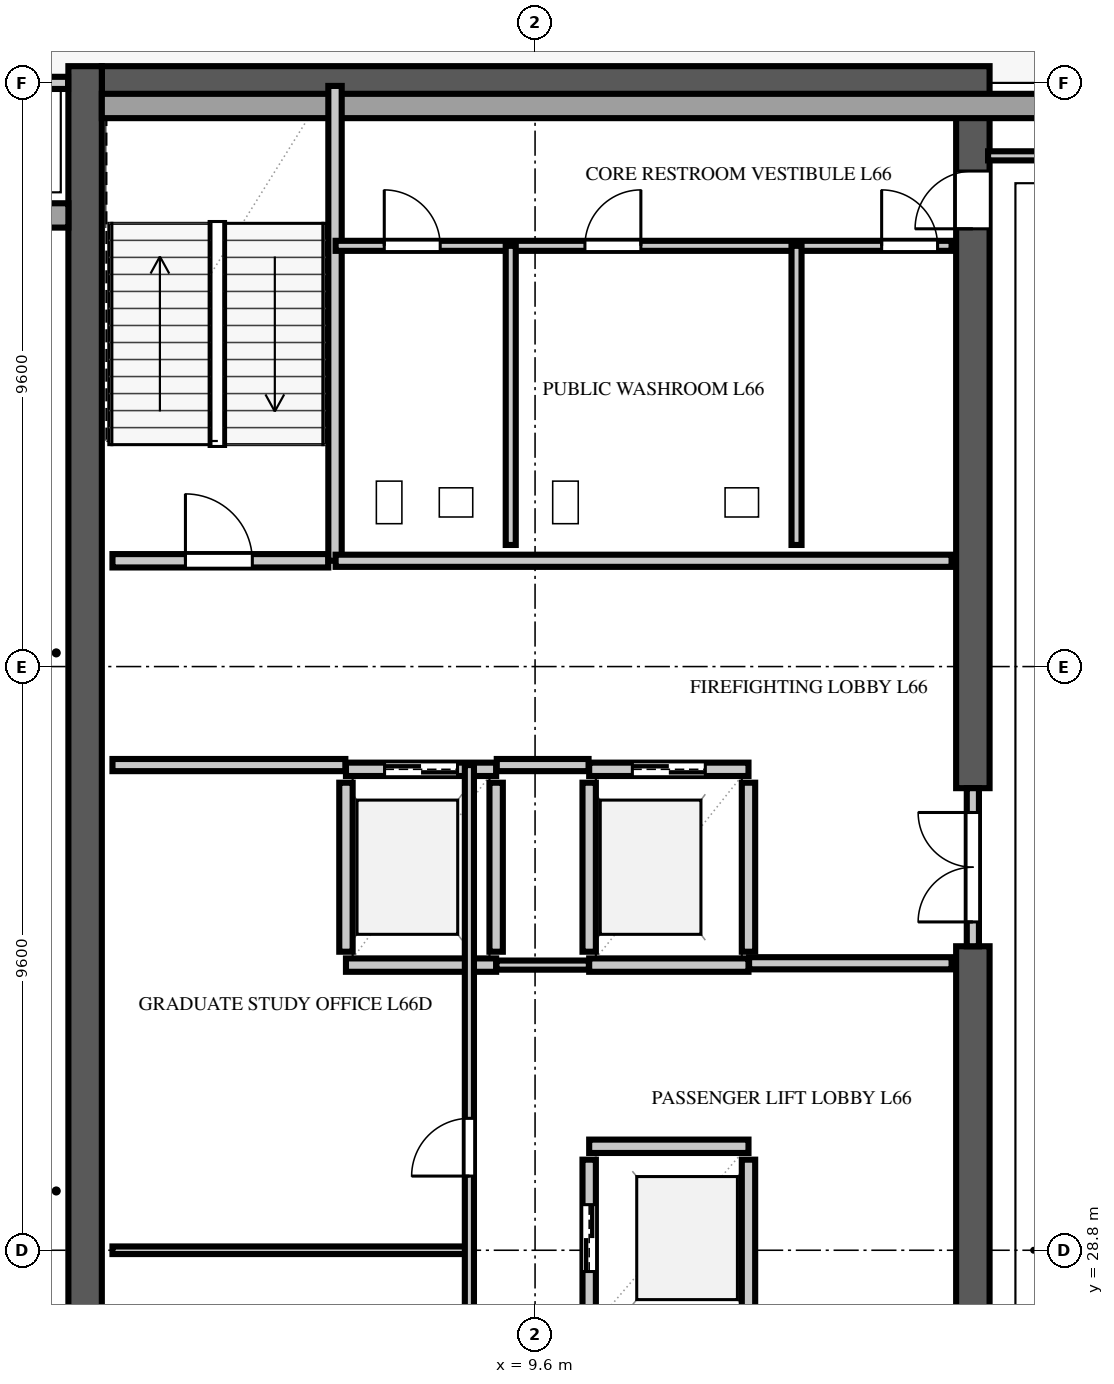
"""IFC4 building model, lengths in metres.
Left out: names, types, materials, properties, quantities, classifications, styles, units other than length and angle.
Written with IfcOpenShell. Run it as: python <this file> out.ifc"""

import sys

from ifc_helpers import new_model, si_unit, direction, frame, frame_2d, origin, place, context, subcontext, project, spatial, rectangle, extrude, element, fill, save


model = new_model("IFC4")
c1 = context("Model", 3, precision=1e-05, world=origin(), true_north=direction((0.0, 1.0)))
c2 = subcontext(c1, "Body", "Model", "MODEL_VIEW")
j1 = project(units=[si_unit("LENGTHUNIT", "METRE"), si_unit("PLANEANGLEUNIT", "RADIAN")], contexts=[c1])
p1 = place(None, origin())
s1 = spatial("IfcSite", under=j1, at=p1, CompositionType="ELEMENT")
p2 = place(p1, origin())
s2 = spatial("IfcBuilding", under=s1, at=p2, CompositionType="ELEMENT")
p3 = place(p2, frame((0.0, 0.0, 261.0)))
s3 = spatial("IfcBuildingStorey", under=s2, at=p3, CompositionType="ELEMENT", Elevation=261.0)
p4 = place(p3, frame((2.475, 48.0, 0.0), z_axis=(0.0, 0.0, 1.0), x_axis=(1.0, 0.0, 0.0)))
e1 = element("IfcWall", 1, at=p4, inside=s3, PredefinedType="SHEAR", context=c2, shape_type="SweptSolid", body=[
    extrude(rectangle(XDim=14.6, YDim=0.55, at=frame_2d((7.3, 0.0))), origin(), (0.0, 0.0, 1.0), 4.54),
])
p5 = place(p3, frame((2.2, 9.325, 0.0), z_axis=(0.0, 0.0, 1.0), x_axis=(0.0, 1.0, 0.0)))
e2 = element("IfcWall", 2, at=p5, inside=s3, PredefinedType="SHEAR", context=c2, shape_type="SweptSolid", body=[
    extrude(rectangle(XDim=38.95, YDim=0.55, at=frame_2d((19.475, 0.0))), origin(), (0.0, 0.0, 1.0), 4.54),
])
p6 = place(p3, frame((16.8, 26.0, 0.0), z_axis=(0.0, 0.0, 1.0), x_axis=(0.0, 1.0, 0.0)))
e3 = element("IfcWall", 3, at=p6, inside=s3, PredefinedType="SHEAR", context=c2, shape_type="SweptSolid", body=[
    extrude(rectangle(XDim=7.8, YDim=0.55, at=frame_2d((3.9, 0.0))), origin(), (0.0, 0.0, 1.0), 4.54),
])
p7 = place(p3, frame((16.8, 36.4, 0.0), z_axis=(0.0, 0.0, 1.0), x_axis=(0.0, 1.0, 0.0)))
e4 = element("IfcWall", 4, at=p7, inside=s3, PredefinedType="SHEAR", context=c2, shape_type="SweptSolid", body=[
    extrude(rectangle(XDim=11.325, YDim=0.55, at=frame_2d((5.663, 0.0))), origin(), (0.0, 0.0, 1.0), 4.54),
])
p8 = place(p7, frame((9.2, 0.0, 0.0)))
e5 = element("IfcOpeningElement", 5, at=p8, cuts=e4, PredefinedType="OPENING", context=c2, shape_type="SweptSolid", body=[
    extrude(rectangle(XDim=0.95, YDim=2.15, at=frame_2d((0.475, 1.075))), frame((0.0, 0.287, 0.0), z_axis=(0.0, -1.0, 0.0), x_axis=(1.0, 0.0, 0.0)), (0.0, 0.0, 1.0), 0.574),
])
p9 = place(p3, frame((36.56, 47.62, 0.0), z_axis=(0.0, 0.0, 1.0), x_axis=(-1.0, 0.0, 0.0)))
e6 = element("IfcWall", 6, at=p9, inside=s3, PredefinedType="SOLIDWALL", context=c2, shape_type="SweptSolid", body=[
    extrude(rectangle(XDim=34.085, YDim=0.4, at=frame_2d((17.042, 0.0))), origin(), (0.0, 0.0, 1.0), 4.54),
])
p10 = place(p9, frame((9.56, 0.0, 0.0)))
e7 = element("IfcOpeningElement", 7, at=p10, cuts=e6, PredefinedType="OPENING", context=c2, shape_type="SweptSolid", body=[
    extrude(rectangle(XDim=1.6, YDim=2.3, at=frame_2d((0.8, 1.15))), frame((0.0, 0.212, 0.0), z_axis=(0.0, -1.0, 0.0), x_axis=(1.0, 0.0, 0.0)), (0.0, 0.0, 1.0), 0.424),
])
p11 = place(p9, frame((4.885, 0.0, 0.9)))
e8 = element("IfcOpeningElement", 8, at=p11, cuts=e6, PredefinedType="OPENING", context=c2, shape_type="SweptSolid", body=[
    extrude(rectangle(XDim=0.95, YDim=1.85, at=frame_2d((0.475, 0.925))), frame((0.0, 0.212, 0.0), z_axis=(0.0, -1.0, 0.0), x_axis=(1.0, 0.0, 0.0)), (0.0, 0.0, 1.0), 0.424),
])
p12 = place(p9, frame((14.485, 0.0, 0.9)))
e9 = element("IfcOpeningElement", 9, at=p12, cuts=e6, PredefinedType="OPENING", context=c2, shape_type="SweptSolid", body=[
    extrude(rectangle(XDim=0.95, YDim=1.85, at=frame_2d((0.475, 0.925))), frame((0.0, 0.212, 0.0), z_axis=(0.0, -1.0, 0.0), x_axis=(1.0, 0.0, 0.0)), (0.0, 0.0, 1.0), 0.424),
])
p13 = place(p3, frame((1.925, 45.82, 0.0), z_axis=(0.0, 0.0, 1.0), x_axis=(-1.0, 0.0, 0.0)))
e10 = element("IfcWall", 10, at=p13, inside=s3, PredefinedType="SOLIDWALL", context=c2, shape_type="SweptSolid", body=[
    extrude(rectangle(XDim=1.885, YDim=0.4, at=frame_2d((0.942, 0.0))), origin(), (0.0, 0.0, 1.0), 4.54),
])
p14 = place(p3, frame((2.65, 40.14, 0.0), z_axis=(0.0, 0.0, 1.0), x_axis=(1.0, 0.0, 0.0)))
e11 = element("IfcWall", 11, at=p14, inside=s3, PredefinedType="SOLIDWALL", context=c2, shape_type="SweptSolid", body=[
    extrude(rectangle(XDim=3.55, YDim=0.22, at=frame_2d((1.775, 0.0))), origin(), (0.0, 0.0, 1.0), 4.54),
])
p15 = place(p14, frame((1.2, 0.0, 0.0)))
e12 = element("IfcOpeningElement", 12, at=p15, cuts=e11, PredefinedType="OPENING", context=c2, shape_type="SweptSolid", body=[
    extrude(rectangle(XDim=1.1, YDim=2.2, at=frame_2d((0.55, 1.1))), frame((0.0, 0.122, 0.0), z_axis=(0.0, -1.0, 0.0), x_axis=(1.0, 0.0, 0.0)), (0.0, 0.0, 1.0), 0.244),
])
p16 = place(p3, frame((6.31, 40.14, 0.0), z_axis=(0.0, 0.0, 1.0), x_axis=(0.0, 1.0, 0.0)))
e13 = element("IfcWall", 13, at=p16, inside=s3, PredefinedType="SOLIDWALL", context=c2, shape_type="SweptSolid", body=[
    extrude(rectangle(XDim=7.81, YDim=0.22, at=frame_2d((3.905, 0.0))), origin(), (0.0, 0.0, 1.0), 4.54),
])
p17 = place(p3, frame((10.49, 27.71, 0.0), z_axis=(0.0, 0.0, 1.0), x_axis=(0.0, 1.0, 0.0)))
e14 = element("IfcWall", 14, at=p17, inside=s3, PredefinedType="SOLIDWALL", context=c2, shape_type="SweptSolid", body=[
    extrude(rectangle(XDim=2.58, YDim=0.22, at=frame_2d((1.29, 0.0))), origin(), (0.0, 0.0, 1.0), 4.54),
])
p18 = place(p17, frame((0.74, 0.0, 0.0)))
e15 = element("IfcOpeningElement", 15, at=p18, cuts=e14, PredefinedType="OPENING", context=c2, shape_type="SweptSolid", body=[
    extrude(rectangle(XDim=1.1, YDim=2.2, at=frame_2d((0.55, 1.1))), frame((0.0, 0.122, 0.0), z_axis=(0.0, -1.0, 0.0), x_axis=(1.0, 0.0, 0.0)), (0.0, 0.0, 1.0), 0.244),
])
p19 = place(p3, frame((13.11, 27.71, 0.0), z_axis=(0.0, 0.0, 1.0), x_axis=(0.0, 1.0, 0.0)))
e16 = element("IfcWall", 16, at=p19, inside=s3, PredefinedType="SOLIDWALL", context=c2, shape_type="SweptSolid", body=[
    extrude(rectangle(XDim=2.58, YDim=0.22, at=frame_2d((1.29, 0.0))), origin(), (0.0, 0.0, 1.0), 4.54),
])
p20 = place(p3, frame((10.49, 30.51, 0.0), z_axis=(0.0, 0.0, 1.0), x_axis=(1.0, 0.0, 0.0)))
e17 = element("IfcWall", 17, at=p20, inside=s3, PredefinedType="SOLIDWALL", context=c2, shape_type="SweptSolid", body=[
    extrude(rectangle(XDim=2.62, YDim=0.22, at=frame_2d((1.31, 0.0))), origin(), (0.0, 0.0, 1.0), 4.54),
])
for number, where, z_axis, x_axis in (
    (18, (6.49, 33.71, 0.0), (0.0, 0.0, 1.0), (0.0, 1.0, 0.0)),
    (19, (8.96, 33.71, 0.0), (0.0, 0.0, 1.0), (0.0, 1.0, 0.0)),
):
    element("IfcWall", number, at=place(p3, frame(where, z_axis=z_axis, x_axis=x_axis)), inside=s3, PredefinedType="SOLIDWALL", context=c2, shape_type="SweptSolid", body=[
        extrude(rectangle(XDim=2.78, YDim=0.22, at=frame_2d((1.39, 0.0))), origin(), (0.0, 0.0, 1.0), 4.54),
    ])
p21 = place(p3, frame((6.49, 33.49, 0.0), z_axis=(0.0, 0.0, 1.0), x_axis=(1.0, 0.0, 0.0)))
e20 = element("IfcWall", 20, at=p21, inside=s3, PredefinedType="SOLIDWALL", context=c2, shape_type="SweptSolid", body=[
    extrude(rectangle(XDim=2.47, YDim=0.22, at=frame_2d((1.235, 0.0))), origin(), (0.0, 0.0, 1.0), 4.54),
])
p22 = place(p3, frame((6.49, 36.71, 0.0), z_axis=(0.0, 0.0, 1.0), x_axis=(1.0, 0.0, 0.0)))
e21 = element("IfcWall", 21, at=p22, inside=s3, PredefinedType="SOLIDWALL", context=c2, shape_type="SweptSolid", body=[
    extrude(rectangle(XDim=2.47, YDim=0.22, at=frame_2d((1.235, 0.0))), origin(), (0.0, 0.0, 1.0), 4.54),
])
p23 = place(p22, frame((0.635, 0.0, 0.0)))
e22 = element("IfcOpeningElement", 22, at=p23, cuts=e21, PredefinedType="OPENING", context=c2, shape_type="SweptSolid", body=[
    extrude(rectangle(XDim=1.2, YDim=2.2, at=frame_2d((0.6, 1.1))), frame((0.0, 0.122, 0.0), z_axis=(0.0, -1.0, 0.0), x_axis=(1.0, 0.0, 0.0)), (0.0, 0.0, 1.0), 0.244),
])
for number, where, z_axis, x_axis in (
    (23, (10.49, 33.71, 0.0), (0.0, 0.0, 1.0), (0.0, 1.0, 0.0)),
    (24, (13.11, 33.71, 0.0), (0.0, 0.0, 1.0), (0.0, 1.0, 0.0)),
):
    element("IfcWall", number, at=place(p3, frame(where, z_axis=z_axis, x_axis=x_axis)), inside=s3, PredefinedType="SOLIDWALL", context=c2, shape_type="SweptSolid", body=[
        extrude(rectangle(XDim=2.78, YDim=0.22, at=frame_2d((1.39, 0.0))), origin(), (0.0, 0.0, 1.0), 4.54),
    ])
p24 = place(p3, frame((10.49, 33.49, 0.0), z_axis=(0.0, 0.0, 1.0), x_axis=(1.0, 0.0, 0.0)))
e25 = element("IfcWall", 25, at=p24, inside=s3, PredefinedType="SOLIDWALL", context=c2, shape_type="SweptSolid", body=[
    extrude(rectangle(XDim=2.62, YDim=0.22, at=frame_2d((1.31, 0.0))), origin(), (0.0, 0.0, 1.0), 4.54),
])
p25 = place(p3, frame((10.49, 36.71, 0.0), z_axis=(0.0, 0.0, 1.0), x_axis=(1.0, 0.0, 0.0)))
e26 = element("IfcWall", 26, at=p25, inside=s3, PredefinedType="SOLIDWALL", context=c2, shape_type="SweptSolid", body=[
    extrude(rectangle(XDim=2.62, YDim=0.22, at=frame_2d((1.31, 0.0))), origin(), (0.0, 0.0, 1.0), 4.54),
])
p26 = place(p25, frame((0.71, 0.0, 0.0)))
e27 = element("IfcOpeningElement", 27, at=p26, cuts=e26, PredefinedType="OPENING", context=c2, shape_type="SweptSolid", body=[
    extrude(rectangle(XDim=1.2, YDim=2.2, at=frame_2d((0.6, 1.1))), frame((0.0, 0.122, 0.0), z_axis=(0.0, -1.0, 0.0), x_axis=(1.0, 0.0, 0.0)), (0.0, 0.0, 1.0), 0.244),
])
p27 = place(p3, frame((2.65, 36.78, 0.0), z_axis=(0.0, 0.0, 1.0), x_axis=(1.0, 0.0, 0.0)))
e28 = element("IfcWall", 28, at=p27, inside=s3, PredefinedType="SOLIDWALL", context=c2, shape_type="SweptSolid", body=[
    extrude(rectangle(XDim=3.83, YDim=0.2, at=frame_2d((1.915, 0.0))), origin(), (0.0, 0.0, 1.0), 4.54),
])
p28 = place(p3, frame((8.97, 36.78, 0.0), z_axis=(0.0, 0.0, 1.0), x_axis=(1.0, 0.0, 0.0)))
e29 = element("IfcWall", 29, at=p28, inside=s3, PredefinedType="SOLIDWALL", context=c2, shape_type="SweptSolid", body=[
    extrude(rectangle(XDim=1.51, YDim=0.2, at=frame_2d((0.755, 0.0))), origin(), (0.0, 0.0, 1.0), 4.54),
])
p29 = place(p3, frame((13.12, 33.52, 0.0), z_axis=(0.0, 0.0, 1.0), x_axis=(1.0, 0.0, 0.0)))
e30 = element("IfcWall", 30, at=p29, inside=s3, PredefinedType="SOLIDWALL", context=c2, shape_type="SweptSolid", body=[
    extrude(rectangle(XDim=3.33, YDim=0.2, at=frame_2d((1.665, 0.0))), origin(), (0.0, 0.0, 1.0), 4.54),
])
p30 = place(p3, frame((6.32, 40.14, 0.0), z_axis=(0.0, 0.0, 1.0), x_axis=(1.0, 0.0, 0.0)))
e31 = element("IfcWall", 31, at=p30, inside=s3, PredefinedType="SOLIDWALL", context=c2, shape_type="SweptSolid", body=[
    extrude(rectangle(XDim=10.13, YDim=0.2, at=frame_2d((5.065, 0.0))), origin(), (0.0, 0.0, 1.0), 4.54),
])
p31 = place(p3, frame((16.8, 33.8, 0.0), z_axis=(0.0, 0.0, 1.0), x_axis=(0.0, 1.0, 0.0)))
e32 = element("IfcWall", 32, at=p31, inside=s3, PredefinedType="SOLIDWALL", context=c2, shape_type="SweptSolid", body=[
    extrude(rectangle(XDim=2.6, YDim=0.2, at=frame_2d((1.3, 0.0))), origin(), (0.0, 0.0, 1.0), 4.54),
])
p32 = place(p31, frame((0.4, 0.0, 0.0)))
e33 = element("IfcOpeningElement", 33, at=p32, cuts=e32, PredefinedType="OPENING", context=c2, shape_type="SweptSolid", body=[
    extrude(rectangle(XDim=1.8, YDim=2.2, at=frame_2d((0.9, 1.1))), frame((0.0, 0.112, 0.0), z_axis=(0.0, -1.0, 0.0), x_axis=(1.0, 0.0, 0.0)), (0.0, 0.0, 1.0), 0.224),
])
p33 = place(p3, frame((8.965, 33.49, 0.0), z_axis=(0.0, 0.0, 1.0), x_axis=(1.0, 0.0, 0.0)))
e34 = element("IfcWall", 34, at=p33, inside=s3, PredefinedType="PARTITIONING", context=c2, shape_type="SweptSolid", body=[
    extrude(rectangle(XDim=1.52, YDim=0.15, at=frame_2d((0.76, 0.0))), origin(), (0.0, 0.0, 1.0), 4.54),
])
p34 = place(p3, frame((2.65, 28.8, 0.0), z_axis=(0.0, 0.0, 1.0), x_axis=(1.0, 0.0, 0.0)))
e35 = element("IfcWall", 35, at=p34, inside=s3, PredefinedType="PARTITIONING", context=c2, shape_type="SweptSolid", body=[
    extrude(rectangle(XDim=5.87, YDim=0.125, at=frame_2d((2.935, 0.0))), origin(), (0.0, 0.0, 1.0), 4.54),
])
p35 = place(p3, frame((8.52, 12.02, 0.0), z_axis=(0.0, 0.0, 1.0), x_axis=(0.0, 1.0, 0.0)))
e36 = element("IfcWall", 36, at=p35, inside=s3, PredefinedType="PARTITIONING", context=c2, shape_type="SweptSolid", body=[
    extrude(rectangle(XDim=24.76, YDim=0.15, at=frame_2d((12.38, 0.0))), origin(), (0.0, 0.0, 1.0), 4.54),
])
p36 = place(p35, frame((2.0, 0.0, 0.0)))
e37 = element("IfcOpeningElement", 37, at=p36, cuts=e36, PredefinedType="OPENING", context=c2, shape_type="SweptSolid", body=[
    extrude(rectangle(XDim=0.85, YDim=2.1, at=frame_2d((0.425, 1.05))), frame((0.0, 0.087, 0.0), z_axis=(0.0, -1.0, 0.0), x_axis=(1.0, 0.0, 0.0)), (0.0, 0.0, 1.0), 0.174),
])
p37 = place(p35, frame((11.0, 0.0, 0.0)))
e38 = element("IfcOpeningElement", 38, at=p37, cuts=e36, PredefinedType="OPENING", context=c2, shape_type="SweptSolid", body=[
    extrude(rectangle(XDim=0.95, YDim=2.15, at=frame_2d((0.475, 1.075))), frame((0.0, 0.087, 0.0), z_axis=(0.0, -1.0, 0.0), x_axis=(1.0, 0.0, 0.0)), (0.0, 0.0, 1.0), 0.174),
])
p38 = place(p35, frame((18.0, 0.0, 0.0)))
e39 = element("IfcOpeningElement", 39, at=p38, cuts=e36, PredefinedType="OPENING", context=c2, shape_type="SweptSolid", body=[
    extrude(rectangle(XDim=0.95, YDim=2.15, at=frame_2d((0.475, 1.075))), frame((0.0, 0.087, 0.0), z_axis=(0.0, -1.0, 0.0), x_axis=(1.0, 0.0, 0.0)), (0.0, 0.0, 1.0), 0.174),
])
p39 = place(p3, frame((6.32, 45.32, 0.0), z_axis=(0.0, 0.0, 1.0), x_axis=(1.0, 0.0, 0.0)))
e40 = element("IfcWall", 40, at=p39, inside=s3, PredefinedType="PLUMBINGWALL", context=c2, shape_type="SweptSolid", body=[
    extrude(rectangle(XDim=10.13, YDim=0.165, at=frame_2d((5.065, 0.0))), origin(), (0.0, 0.0, 1.0), 4.54),
])
p40 = place(p39, frame((0.8, 0.0, 0.0)))
e41 = element("IfcOpeningElement", 41, at=p40, cuts=e40, PredefinedType="OPENING", context=c2, shape_type="SweptSolid", body=[
    extrude(rectangle(XDim=0.92, YDim=2.15, at=frame_2d((0.46, 1.075))), frame((0.0, 0.094, 0.0), z_axis=(0.0, -1.0, 0.0), x_axis=(1.0, 0.0, 0.0)), (0.0, 0.0, 1.0), 0.189),
])
p41 = place(p39, frame((4.1, 0.0, 0.0)))
e42 = element("IfcOpeningElement", 42, at=p41, cuts=e40, PredefinedType="OPENING", context=c2, shape_type="SweptSolid", body=[
    extrude(rectangle(XDim=0.92, YDim=2.15, at=frame_2d((0.46, 1.075))), frame((0.0, 0.094, 0.0), z_axis=(0.0, -1.0, 0.0), x_axis=(1.0, 0.0, 0.0)), (0.0, 0.0, 1.0), 0.189),
])
p42 = place(p39, frame((8.98, 0.0, 0.0)))
e43 = element("IfcOpeningElement", 43, at=p42, cuts=e40, PredefinedType="OPENING", context=c2, shape_type="SweptSolid", body=[
    extrude(rectangle(XDim=0.92, YDim=2.15, at=frame_2d((0.46, 1.075))), frame((0.0, 0.094, 0.0), z_axis=(0.0, -1.0, 0.0), x_axis=(1.0, 0.0, 0.0)), (0.0, 0.0, 1.0), 0.189),
])
for number, where, z_axis, x_axis in (
    (44, (9.2, 40.4, 0.0), (0.0, 0.0, 1.0), (0.0, 1.0, 0.0)),
    (45, (13.9, 40.4, 0.0), (0.0, 0.0, 1.0), (0.0, 1.0, 0.0)),
):
    element("IfcWall", number, at=place(p3, frame(where, z_axis=z_axis, x_axis=x_axis)), inside=s3, PredefinedType="PLUMBINGWALL", context=c2, shape_type="SweptSolid", body=[
        extrude(rectangle(XDim=4.92, YDim=0.165, at=frame_2d((2.46, 0.0))), origin(), (0.0, 0.0, 1.0), 4.54),
    ])
p43 = place(p3, frame((0.85, 48.0, 0.0), z_axis=(0.0, 0.0, 1.0), x_axis=(1.0, 0.0, 0.0)))
e46 = element("IfcWall", 46, at=p43, inside=s3, PredefinedType="SOLIDWALL", context=c2, shape_type="SweptSolid", body=[
    extrude(rectangle(XDim=1.07, YDim=0.2, at=frame_2d((0.535, 0.0))), origin(), (0.0, 0.0, 1.0), 4.54),
])
p44 = place(p3, frame((17.05, 46.8, 0.0), z_axis=(0.0, 0.0, 1.0), x_axis=(1.0, 0.0, 0.0)))
e47 = element("IfcWall", 47, at=p44, inside=s3, PredefinedType="PARTITIONING", context=c2, shape_type="SweptSolid", body=[
    extrude(rectangle(XDim=2.15, YDim=0.15, at=frame_2d((1.075, 0.0))), origin(), (0.0, 0.0, 1.0), 4.54),
])
p45 = place(p15, origin())
e48 = element("IfcDoor", 48, at=p45, inside=s3, OperationType="SINGLE_SWING_LEFT", PredefinedType="DOOR", context=c2, shape_type="SweptSolid", body=[
    extrude(rectangle(XDim=1.1, YDim=2.2, at=frame_2d((0.55, 1.1))), frame((0.0, 0.025, 0.0), z_axis=(0.0, -1.0, 0.0), x_axis=(1.0, 0.0, 0.0)), (0.0, 0.0, 1.0), 0.05),
])
fill(e12, e48)
p46 = place(p18, origin())
e49 = element("IfcDoor", 49, at=p46, inside=s3, OperationType="DOUBLE_DOOR_SLIDING", PredefinedType="DOOR", context=c2, shape_type="SweptSolid", body=[
    extrude(rectangle(XDim=1.1, YDim=2.2, at=frame_2d((0.55, 1.1))), frame((0.0, 0.025, 0.0), z_axis=(0.0, -1.0, 0.0), x_axis=(1.0, 0.0, 0.0)), (0.0, 0.0, 1.0), 0.05),
])
fill(e15, e49)
p47 = place(p23, origin())
e50 = element("IfcDoor", 50, at=p47, inside=s3, OperationType="DOUBLE_DOOR_SLIDING", PredefinedType="DOOR", context=c2, shape_type="SweptSolid", body=[
    extrude(rectangle(XDim=1.2, YDim=2.2, at=frame_2d((0.6, 1.1))), frame((0.0, 0.025, 0.0), z_axis=(0.0, -1.0, 0.0), x_axis=(1.0, 0.0, 0.0)), (0.0, 0.0, 1.0), 0.05),
])
fill(e22, e50)
p48 = place(p26, origin())
e51 = element("IfcDoor", 51, at=p48, inside=s3, OperationType="DOUBLE_DOOR_SLIDING", PredefinedType="DOOR", context=c2, shape_type="SweptSolid", body=[
    extrude(rectangle(XDim=1.2, YDim=2.2, at=frame_2d((0.6, 1.1))), frame((0.0, 0.025, 0.0), z_axis=(0.0, -1.0, 0.0), x_axis=(1.0, 0.0, 0.0)), (0.0, 0.0, 1.0), 0.05),
])
fill(e27, e51)
p49 = place(p8, origin())
e52 = element("IfcDoor", 52, at=p49, inside=s3, OperationType="SINGLE_SWING_LEFT", PredefinedType="DOOR", context=c2, shape_type="SweptSolid", body=[
    extrude(rectangle(XDim=0.95, YDim=2.15, at=frame_2d((0.475, 1.075))), frame((0.0, 0.025, 0.0), z_axis=(0.0, -1.0, 0.0), x_axis=(1.0, 0.0, 0.0)), (0.0, 0.0, 1.0), 0.05),
])
fill(e5, e52)
p50 = place(p32, origin())
e53 = element("IfcDoor", 53, at=p50, inside=s3, OperationType="DOUBLE_DOOR_SINGLE_SWING", PredefinedType="DOOR", context=c2, shape_type="SweptSolid", body=[
    extrude(rectangle(XDim=1.8, YDim=2.2, at=frame_2d((0.9, 1.1))), frame((0.0, 0.025, 0.0), z_axis=(0.0, -1.0, 0.0), x_axis=(1.0, 0.0, 0.0)), (0.0, 0.0, 1.0), 0.05),
])
fill(e33, e53)
p51 = place(p38, origin())
e54 = element("IfcDoor", 54, at=p51, inside=s3, OperationType="SINGLE_SWING_LEFT", PredefinedType="DOOR", context=c2, shape_type="SweptSolid", body=[
    extrude(rectangle(XDim=0.95, YDim=2.15, at=frame_2d((0.475, 1.075))), frame((0.0, 0.025, 0.0), z_axis=(0.0, -1.0, 0.0), x_axis=(1.0, 0.0, 0.0)), (0.0, 0.0, 1.0), 0.05),
])
fill(e39, e54)
p52 = place(p40, origin())
e55 = element("IfcDoor", 55, at=p52, inside=s3, OperationType="SINGLE_SWING_LEFT", PredefinedType="DOOR", context=c2, shape_type="SweptSolid", body=[
    extrude(rectangle(XDim=0.92, YDim=2.15, at=frame_2d((0.46, 1.075))), frame((0.0, 0.025, 0.0), z_axis=(0.0, -1.0, 0.0), x_axis=(1.0, 0.0, 0.0)), (0.0, 0.0, 1.0), 0.05),
])
fill(e41, e55)
p53 = place(p41, origin())
e56 = element("IfcDoor", 56, at=p53, inside=s3, OperationType="SINGLE_SWING_RIGHT", PredefinedType="DOOR", context=c2, shape_type="SweptSolid", body=[
    extrude(rectangle(XDim=0.92, YDim=2.15, at=frame_2d((0.46, 1.075))), frame((0.0, 0.025, 0.0), z_axis=(0.0, -1.0, 0.0), x_axis=(1.0, 0.0, 0.0)), (0.0, 0.0, 1.0), 0.05),
])
fill(e42, e56)
p54 = place(p42, origin())
e57 = element("IfcDoor", 57, at=p54, inside=s3, OperationType="SINGLE_SWING_LEFT", PredefinedType="DOOR", context=c2, shape_type="SweptSolid", body=[
    extrude(rectangle(XDim=0.92, YDim=2.15, at=frame_2d((0.46, 1.075))), frame((0.0, 0.025, 0.0), z_axis=(0.0, -1.0, 0.0), x_axis=(1.0, 0.0, 0.0)), (0.0, 0.0, 1.0), 0.05),
])
fill(e43, e57)
save(model, sys.argv[1])
